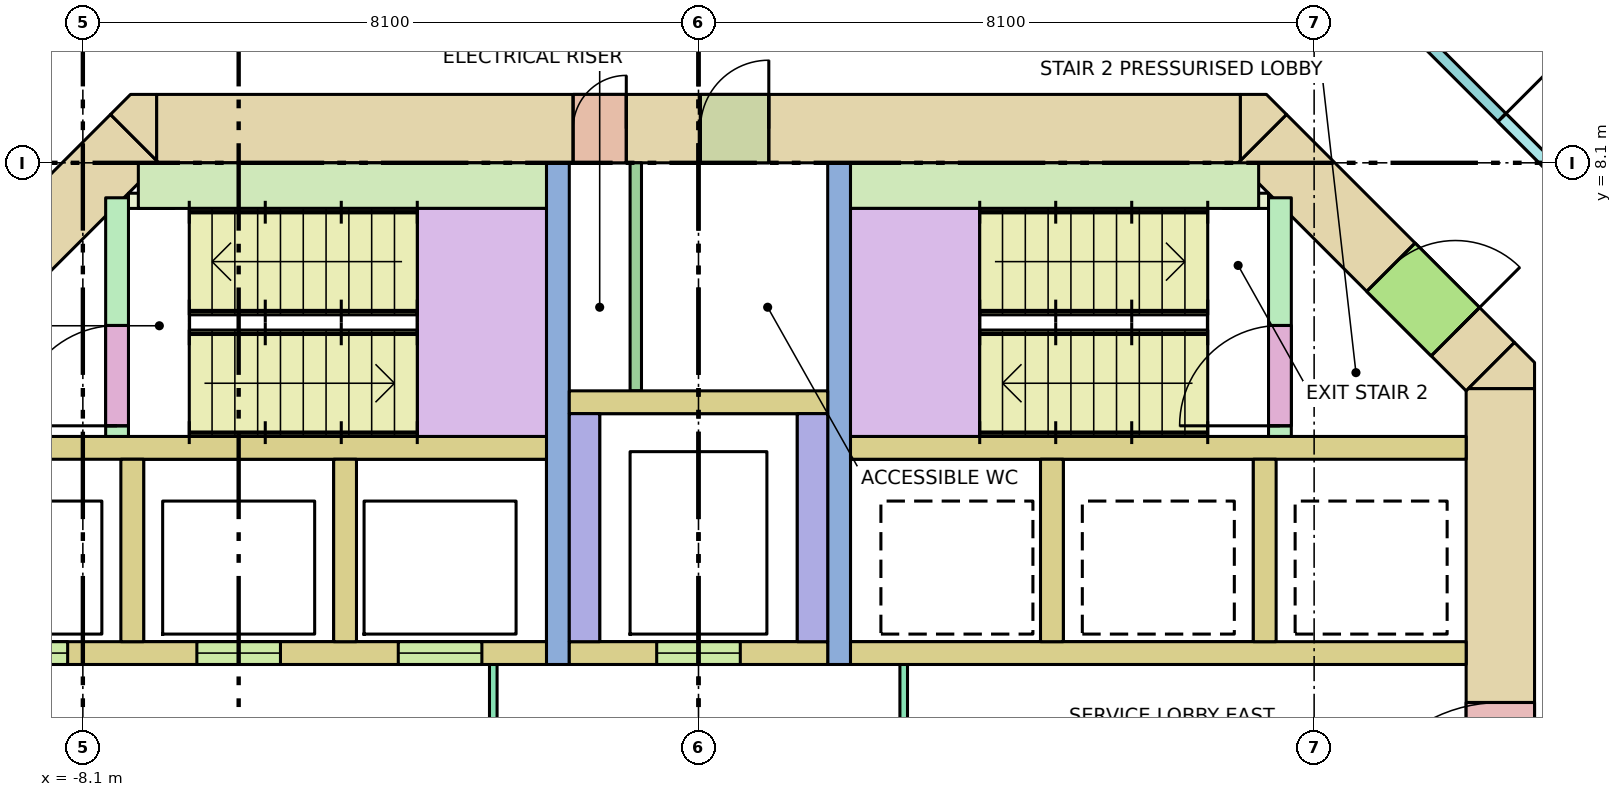
"""IFC4 building model, lengths in metres.
Left out: names, types, materials, properties, quantities, classifications, styles, units other than length and angle.
Written with IfcOpenShell. Run it as: python <this file> out.ifc"""

import sys

from ifc_helpers import new_model, si_unit, direction, frame, frame_2d, origin, place, context, subcontext, project, spatial, polyline, rectangle, outline, extrude, element, fill, save


model = new_model("IFC4")
c1 = context("Model", 3, precision=1e-05, world=origin(), true_north=direction((0.0, 1.0)))
c2 = subcontext(c1, "Body", "Model", "MODEL_VIEW")
j1 = project(units=[si_unit("LENGTHUNIT", "METRE"), si_unit("PLANEANGLEUNIT", "RADIAN")], contexts=[c1])
p1 = place(None, origin())
s1 = spatial("IfcSite", under=j1, at=p1, CompositionType="ELEMENT")
p2 = place(p1, origin())
s2 = spatial("IfcBuilding", under=s1, at=p2, CompositionType="ELEMENT")
p3 = place(p2, frame((0.0, 0.0, 127.6)))
s3 = spatial("IfcBuildingStorey", under=s2, at=p3, CompositionType="ELEMENT", Elevation=127.6)
p4 = place(p3, frame((-7.13, 8.55, -0.28), z_axis=(0.0, 0.0, 1.0), x_axis=(1.0, 0.0, 0.0)))
e1 = element("IfcWall", 1, at=p4, inside=s3, PredefinedType="SHEAR", context=c2, shape_type="SweptSolid", body=[
    extrude(rectangle(XDim=14.26, YDim=0.9, at=frame_2d((7.13, 0.0))), origin(), (0.0, 0.0, 1.0), 3.8),
])
p5 = place(p4, frame((5.48, 0.0, 0.28)))
e2 = element("IfcOpeningElement", 2, at=p5, cuts=e1, PredefinedType="OPENING", context=c2, shape_type="SweptSolid", body=[
    extrude(rectangle(XDim=0.7, YDim=2.1, at=frame_2d((0.35, 1.05))), frame((0.0, 0.46, 0.0), z_axis=(0.0, -1.0, 0.0), x_axis=(1.0, 0.0, 0.0)), (0.0, 0.0, 1.0), 0.92),
])
p6 = place(p4, frame((7.155, 0.0, 0.28)))
e3 = element("IfcOpeningElement", 3, at=p6, cuts=e1, PredefinedType="OPENING", context=c2, shape_type="SweptSolid", body=[
    extrude(rectangle(XDim=0.9, YDim=2.1, at=frame_2d((0.45, 1.05))), frame((0.0, 0.46, 0.0), z_axis=(0.0, -1.0, 0.0), x_axis=(1.0, 0.0, 0.0)), (0.0, 0.0, 1.0), 0.92),
])
p7 = place(p3, frame((10.55, -5.13, -0.28), z_axis=(0.0, 0.0, 1.0), x_axis=(0.0, 1.0, 0.0)))
e4 = element("IfcWall", 4, at=p7, inside=s3, PredefinedType="SHEAR", context=c2, shape_type="SweptSolid", body=[
    extrude(rectangle(XDim=10.26, YDim=0.9, at=frame_2d((5.13, 0.0))), origin(), (0.0, 0.0, 1.0), 3.8),
])
p8 = place(p7, frame((4.13, 0.0, 0.28)))
e5 = element("IfcOpeningElement", 5, at=p8, cuts=e4, PredefinedType="OPENING", context=c2, shape_type="SweptSolid", body=[
    extrude(rectangle(XDim=2.0, YDim=2.1, at=frame_2d((1.0, 1.05))), frame((0.0, 0.46, 0.0), z_axis=(0.0, -1.0, 0.0), x_axis=(1.0, 0.0, 0.0)), (0.0, 0.0, 1.0), 0.92),
])
p9 = place(p3, frame((-10.418, 5.418, -0.28), z_axis=(0.0, 0.0, 1.0), x_axis=(0.707106781187, 0.707106781187, 0.0)))
e6 = element("IfcWall", 6, at=p9, inside=s3, PredefinedType="SHEAR", context=c2, shape_type="SweptSolid", body=[
    extrude(rectangle(XDim=4.243, YDim=0.9, at=frame_2d((2.121, 0.0))), origin(), (0.0, 0.0, 1.0), 3.8),
])
p10 = place(p9, frame((0.65, 0.0, 0.28)))
e7 = element("IfcOpeningElement", 7, at=p10, cuts=e6, PredefinedType="OPENING", context=c2, shape_type="SweptSolid", body=[
    extrude(rectangle(XDim=1.2, YDim=2.1, at=frame_2d((0.6, 1.05))), frame((0.0, 0.46, 0.0), z_axis=(0.0, -1.0, 0.0), x_axis=(1.0, 0.0, 0.0)), (0.0, 0.0, 1.0), 0.92),
])
p11 = place(p3, frame((7.418, 8.418, -0.28), z_axis=(0.0, 0.0, 1.0), x_axis=(0.707106781187, -0.707106781187, 0.0)))
e8 = element("IfcWall", 8, at=p11, inside=s3, PredefinedType="SHEAR", context=c2, shape_type="SweptSolid", body=[
    extrude(rectangle(XDim=4.243, YDim=0.9, at=frame_2d((2.121, 0.0))), origin(), (0.0, 0.0, 1.0), 3.8),
])
p12 = place(p11, frame((2.393, 0.0, 0.28)))
e9 = element("IfcOpeningElement", 9, at=p12, cuts=e8, PredefinedType="OPENING", context=c2, shape_type="SweptSolid", body=[
    extrude(rectangle(XDim=1.2, YDim=2.1, at=frame_2d((0.6, 1.05))), frame((0.0, 0.46, 0.0), z_axis=(0.0, -1.0, 0.0), x_axis=(1.0, 0.0, 0.0)), (0.0, 0.0, 1.0), 0.92),
])
p13 = place(p3, frame((0.0, 0.0, -0.28)))
e10 = element("IfcWall", 10, at=p13, inside=s3, PredefinedType="SHEAR", context=c2, shape_type="SweptSolid", body=[
    extrude(outline(polyline([(11.0, 5.473), (11.0, 5.13), (10.13, 5.13), (10.736, 5.736), (11.0, 5.473)])), origin(), (0.0, 0.0, 1.0), 3.8),
])
p14 = place(p3, frame((0.0, 0.0, -0.28)))
e11 = element("IfcWall", 11, at=p14, inside=s3, PredefinedType="SHEAR", context=c2, shape_type="SweptSolid", body=[
    extrude(outline(polyline([(-7.473, 9.0), (-7.13, 9.0), (-7.13, 8.13), (-7.736, 8.736), (-7.473, 9.0)])), origin(), (0.0, 0.0, 1.0), 3.8),
])
p15 = place(p3, frame((0.0, 0.0, -0.28)))
e12 = element("IfcWall", 12, at=p15, inside=s3, PredefinedType="SHEAR", context=c2, shape_type="SweptSolid", body=[
    extrude(outline(polyline([(7.473, 9.0), (7.736, 8.736), (7.13, 8.13), (7.13, 9.0), (7.473, 9.0)])), origin(), (0.0, 0.0, 1.0), 3.8),
])
for number, where, z_axis, x_axis in (
    (13, (-10.1, 4.35, 0.0), (0.0, 0.0, 1.0), (1.0, 0.0, 0.0)),
    (14, (2.0, 4.35, 0.0), (0.0, 0.0, 1.0), (1.0, 0.0, 0.0)),
):
    element("IfcWall", number, at=place(p3, frame(where, z_axis=z_axis, x_axis=x_axis)), inside=s3, PredefinedType="SOLIDWALL", context=c2, shape_type="SweptSolid", body=[
        extrude(rectangle(XDim=8.1, YDim=0.3, at=frame_2d((4.05, 0.0))), origin(), (0.0, 0.0, 1.0), 3.52),
    ])
p16 = place(p3, frame((-10.1, 1.65, 0.0), z_axis=(0.0, 0.0, 1.0), x_axis=(1.0, 0.0, 0.0)))
e15 = element("IfcWall", 15, at=p16, inside=s3, PredefinedType="SOLIDWALL", context=c2, shape_type="SweptSolid", body=[
    extrude(rectangle(XDim=8.1, YDim=0.3, at=frame_2d((4.05, 0.0))), origin(), (0.0, 0.0, 1.0), 3.52),
])
p17 = place(p16, frame((0.7, 0.0, 0.0)))
e16 = element("IfcOpeningElement", 16, at=p17, cuts=e15, PredefinedType="OPENING", context=c2, shape_type="SweptSolid", body=[
    extrude(rectangle(XDim=1.1, YDim=2.1, at=frame_2d((0.55, 1.05))), frame((0.0, 0.16, 0.0), z_axis=(0.0, -1.0, 0.0), x_axis=(1.0, 0.0, 0.0)), (0.0, 0.0, 1.0), 0.32),
])
p18 = place(p16, frame((3.5, 0.0, 0.0)))
e17 = element("IfcOpeningElement", 17, at=p18, cuts=e15, PredefinedType="OPENING", context=c2, shape_type="SweptSolid", body=[
    extrude(rectangle(XDim=1.1, YDim=2.1, at=frame_2d((0.55, 1.05))), frame((0.0, 0.16, 0.0), z_axis=(0.0, -1.0, 0.0), x_axis=(1.0, 0.0, 0.0)), (0.0, 0.0, 1.0), 0.32),
])
p19 = place(p16, frame((6.15, 0.0, 0.0)))
e18 = element("IfcOpeningElement", 18, at=p19, cuts=e15, PredefinedType="OPENING", context=c2, shape_type="SweptSolid", body=[
    extrude(rectangle(XDim=1.1, YDim=2.1, at=frame_2d((0.55, 1.05))), frame((0.0, 0.16, 0.0), z_axis=(0.0, -1.0, 0.0), x_axis=(1.0, 0.0, 0.0)), (0.0, 0.0, 1.0), 0.32),
])
p20 = place(p3, frame((2.0, 1.65, 0.0), z_axis=(0.0, 0.0, 1.0), x_axis=(1.0, 0.0, 0.0)))
e19 = element("IfcWall", 19, at=p20, inside=s3, PredefinedType="SOLIDWALL", context=c2, shape_type="SweptSolid", body=[
    extrude(rectangle(XDim=8.1, YDim=0.3, at=frame_2d((4.05, 0.0))), origin(), (0.0, 0.0, 1.0), 3.52),
])
for number, where, z_axis, x_axis in (
    (20, (-7.45, 1.8, 0.0), (0.0, 0.0, 1.0), (0.0, 1.0, 0.0)),
    (21, (-4.65, 1.8, 0.0), (0.0, 0.0, 1.0), (0.0, 1.0, 0.0)),
    (22, (4.65, 1.8, 0.0), (0.0, 0.0, 1.0), (0.0, 1.0, 0.0)),
    (23, (7.45, 1.8, 0.0), (0.0, 0.0, 1.0), (0.0, 1.0, 0.0)),
):
    element("IfcWall", number, at=place(p3, frame(where, z_axis=z_axis, x_axis=x_axis)), inside=s3, PredefinedType="SOLIDWALL", context=c2, shape_type="SweptSolid", body=[
        extrude(rectangle(XDim=2.4, YDim=0.3, at=frame_2d((1.2, 0.0))), origin(), (0.0, 0.0, 1.0), 3.52),
    ])
for number, where, z_axis, x_axis in (
    (24, (-1.85, 1.5, 0.0), (0.0, 0.0, 1.0), (0.0, 1.0, 0.0)),
    (25, (1.85, 1.5, 0.0), (0.0, 0.0, 1.0), (0.0, 1.0, 0.0)),
):
    element("IfcWall", number, at=place(p3, frame(where, z_axis=z_axis, x_axis=x_axis)), inside=s3, PredefinedType="SHEAR", context=c2, shape_type="SweptSolid", body=[
        extrude(rectangle(XDim=6.6, YDim=0.3, at=frame_2d((3.3, 0.0))), origin(), (0.0, 0.0, 1.0), 3.52),
    ])
p21 = place(p3, frame((-1.7, 1.65, 0.0), z_axis=(0.0, 0.0, 1.0), x_axis=(1.0, 0.0, 0.0)))
e26 = element("IfcWall", 26, at=p21, inside=s3, PredefinedType="SOLIDWALL", context=c2, shape_type="SweptSolid", body=[
    extrude(rectangle(XDim=3.4, YDim=0.3, at=frame_2d((1.7, 0.0))), origin(), (0.0, 0.0, 1.0), 3.52),
])
p22 = place(p21, frame((1.15, 0.0, 0.0)))
e27 = element("IfcOpeningElement", 27, at=p22, cuts=e26, PredefinedType="OPENING", context=c2, shape_type="SweptSolid", body=[
    extrude(rectangle(XDim=1.1, YDim=2.1, at=frame_2d((0.55, 1.05))), frame((0.0, 0.16, 0.0), z_axis=(0.0, -1.0, 0.0), x_axis=(1.0, 0.0, 0.0)), (0.0, 0.0, 1.0), 0.32),
])
for number, where, z_axis, x_axis in (
    (28, (-1.5, 1.8, 0.0), (0.0, 0.0, 1.0), (0.0, 1.0, 0.0)),
    (29, (1.5, 1.8, 0.0), (0.0, 0.0, 1.0), (0.0, 1.0, 0.0)),
):
    element("IfcWall", number, at=place(p3, frame(where, z_axis=z_axis, x_axis=x_axis)), inside=s3, PredefinedType="SOLIDWALL", context=c2, shape_type="SweptSolid", body=[
        extrude(rectangle(XDim=3.0, YDim=0.4, at=frame_2d((1.5, 0.0))), origin(), (0.0, 0.0, 1.0), 3.52),
    ])
p23 = place(p3, frame((-1.7, 4.95, 0.0), z_axis=(0.0, 0.0, 1.0), x_axis=(1.0, 0.0, 0.0)))
e30 = element("IfcWall", 30, at=p23, inside=s3, PredefinedType="SOLIDWALL", context=c2, shape_type="SweptSolid", body=[
    extrude(rectangle(XDim=3.4, YDim=0.3, at=frame_2d((1.7, 0.0))), origin(), (0.0, 0.0, 1.0), 3.52),
])
p24 = place(p3, frame((-7.65, 4.5, 0.0), z_axis=(0.0, 0.0, 1.0), x_axis=(0.0, 1.0, 0.0)))
e31 = element("IfcWall", 31, at=p24, inside=s3, PredefinedType="SHEAR", context=c2, shape_type="SweptSolid", body=[
    extrude(rectangle(XDim=3.14, YDim=0.3, at=frame_2d((1.57, 0.0))), origin(), (0.0, 0.0, 1.0), 3.52),
])
p25 = place(p24, frame((0.14, 0.0, 0.0)))
e32 = element("IfcOpeningElement", 32, at=p25, cuts=e31, PredefinedType="OPENING", context=c2, shape_type="SweptSolid", body=[
    extrude(rectangle(XDim=1.32, YDim=2.1, at=frame_2d((0.66, 1.05))), frame((0.0, 0.16, 0.0), z_axis=(0.0, -1.0, 0.0), x_axis=(1.0, 0.0, 0.0)), (0.0, 0.0, 1.0), 0.32),
])
p26 = place(p3, frame((-7.37, 7.8, 0.0), z_axis=(0.0, 0.0, 1.0), x_axis=(1.0, 0.0, 0.0)))
e33 = element("IfcWall", 33, at=p26, inside=s3, PredefinedType="SHEAR", context=c2, shape_type="SweptSolid", body=[
    extrude(rectangle(XDim=5.37, YDim=0.6, at=frame_2d((2.685, 0.0))), origin(), (0.0, 0.0, 1.0), 3.52),
])
p27 = place(p3, frame((7.65, 4.5, 0.0), z_axis=(0.0, 0.0, 1.0), x_axis=(0.0, 1.0, 0.0)))
e34 = element("IfcWall", 34, at=p27, inside=s3, PredefinedType="SHEAR", context=c2, shape_type="SweptSolid", body=[
    extrude(rectangle(XDim=3.14, YDim=0.3, at=frame_2d((1.57, 0.0))), origin(), (0.0, 0.0, 1.0), 3.52),
])
p28 = place(p27, frame((0.14, 0.0, 0.0)))
e35 = element("IfcOpeningElement", 35, at=p28, cuts=e34, PredefinedType="OPENING", context=c2, shape_type="SweptSolid", body=[
    extrude(rectangle(XDim=1.32, YDim=2.1, at=frame_2d((0.66, 1.05))), frame((0.0, 0.16, 0.0), z_axis=(0.0, -1.0, 0.0), x_axis=(1.0, 0.0, 0.0)), (0.0, 0.0, 1.0), 0.32),
])
p29 = place(p3, frame((2.0, 7.8, 0.0), z_axis=(0.0, 0.0, 1.0), x_axis=(1.0, 0.0, 0.0)))
e36 = element("IfcWall", 36, at=p29, inside=s3, PredefinedType="SHEAR", context=c2, shape_type="SweptSolid", body=[
    extrude(rectangle(XDim=5.37, YDim=0.6, at=frame_2d((2.685, 0.0))), origin(), (0.0, 0.0, 1.0), 3.52),
])
for number, where, z_axis, x_axis in (
    (37, (-7.5, 7.6, 0.0), (0.0, 0.0, 1.0), (1.0, 0.0, 0.0)),
    (38, (6.9, 7.6, 0.0), (0.0, 0.0, 1.0), (1.0, 0.0, 0.0)),
):
    element("IfcWall", number, at=place(p3, frame(where, z_axis=z_axis, x_axis=x_axis)), inside=s3, PredefinedType="SHEAR", context=c2, shape_type="SweptSolid", body=[
        extrude(rectangle(XDim=0.6, YDim=0.2, at=frame_2d((0.3, 0.0))), origin(), (0.0, 0.0, 1.0), 3.52),
    ])
p30 = place(p3, frame((-2.7, -1.5, 0.0), z_axis=(0.0, 0.0, 1.0), x_axis=(0.0, 1.0, 0.0)))
e39 = element("IfcWall", 39, at=p30, inside=s3, PredefinedType="PARTITIONING", context=c2, shape_type="SweptSolid", body=[
    extrude(rectangle(XDim=3.0, YDim=0.1, at=frame_2d((1.5, 0.0))), origin(), (0.0, 0.0, 1.0), 3.52),
])
p31 = place(p30, frame((0.9, 0.0, 0.0)))
e40 = element("IfcOpeningElement", 40, at=p31, cuts=e39, PredefinedType="OPENING", context=c2, shape_type="SweptSolid", body=[
    extrude(rectangle(XDim=1.2, YDim=2.1, at=frame_2d((0.6, 1.05))), frame((0.0, 0.06, 0.0), z_axis=(0.0, -1.0, 0.0), x_axis=(1.0, 0.0, 0.0)), (0.0, 0.0, 1.0), 0.12),
])
p32 = place(p3, frame((2.7, -1.5, 0.0), z_axis=(0.0, 0.0, 1.0), x_axis=(0.0, 1.0, 0.0)))
e41 = element("IfcWall", 41, at=p32, inside=s3, PredefinedType="PARTITIONING", context=c2, shape_type="SweptSolid", body=[
    extrude(rectangle(XDim=3.0, YDim=0.1, at=frame_2d((1.5, 0.0))), origin(), (0.0, 0.0, 1.0), 3.52),
])
p33 = place(p32, frame((0.9, 0.0, 0.0)))
e42 = element("IfcOpeningElement", 42, at=p33, cuts=e41, PredefinedType="OPENING", context=c2, shape_type="SweptSolid", body=[
    extrude(rectangle(XDim=1.2, YDim=2.1, at=frame_2d((0.6, 1.05))), frame((0.0, 0.06, 0.0), z_axis=(0.0, -1.0, 0.0), x_axis=(1.0, 0.0, 0.0)), (0.0, 0.0, 1.0), 0.12),
])
p34 = place(p3, frame((-0.825, 5.1, 0.0), z_axis=(0.0, 0.0, 1.0), x_axis=(0.0, 1.0, 0.0)))
e43 = element("IfcWall", 43, at=p34, inside=s3, PredefinedType="PARTITIONING", context=c2, shape_type="SweptSolid", body=[
    extrude(rectangle(XDim=3.0, YDim=0.15, at=frame_2d((1.5, 0.0))), origin(), (0.0, 0.0, 1.0), 3.52),
])
p35 = place(p3, frame((-12.938, 6.328, 0.0), z_axis=(0.0, 0.0, 1.0), x_axis=(0.707088206597, 0.707125355289, 0.0)))
e44 = element("IfcWall", 44, at=p35, inside=s3, PredefinedType="PARTITIONING", context=c2, shape_type="SweptSolid", body=[
    extrude(rectangle(XDim=6.572, YDim=0.15, at=frame_2d((3.286, 0.0))), origin(), (0.0, 0.0, 1.0), 2.67),
])
p36 = place(p35, frame((2.398, 0.0, 0.0)))
e45 = element("IfcOpeningElement", 45, at=p36, cuts=e44, PredefinedType="OPENING", context=c2, shape_type="SweptSolid", body=[
    extrude(rectangle(XDim=0.9, YDim=2.1, at=frame_2d((0.45, 1.05))), frame((0.0, 0.085, 0.0), z_axis=(0.0, -1.0, 0.0), x_axis=(1.0, 0.0, 0.0)), (0.0, 0.0, 1.0), 0.17),
])
p37 = place(p3, frame((8.291, 10.975, 0.0), z_axis=(0.0, 0.0, 1.0), x_axis=(0.707106781187, -0.707106781187, 0.0)))
e46 = element("IfcWall", 46, at=p37, inside=s3, PredefinedType="PARTITIONING", context=c2, shape_type="SweptSolid", body=[
    extrude(rectangle(XDim=6.624, YDim=0.15, at=frame_2d((3.312, 0.0))), origin(), (0.0, 0.0, 1.0), 2.67),
])
p38 = place(p37, frame((3.224, 0.0, 0.0)))
e47 = element("IfcOpeningElement", 47, at=p38, cuts=e46, PredefinedType="OPENING", context=c2, shape_type="SweptSolid", body=[
    extrude(rectangle(XDim=1.0, YDim=2.1, at=frame_2d((0.5, 1.05))), frame((0.0, 0.085, 0.0), z_axis=(0.0, -1.0, 0.0), x_axis=(1.0, 0.0, 0.0)), (0.0, 0.0, 1.0), 0.17),
])
p39 = place(p37, frame((0.524, 0.0, 0.0)))
e48 = element("IfcOpeningElement", 48, at=p39, cuts=e46, PredefinedType="OPENING", context=c2, shape_type="SweptSolid", body=[
    extrude(rectangle(XDim=0.9, YDim=2.1, at=frame_2d((0.45, 1.05))), frame((0.0, 0.085, 0.0), z_axis=(0.0, -1.0, 0.0), x_axis=(1.0, 0.0, 0.0)), (0.0, 0.0, 1.0), 0.17),
])
p40 = place(p17, origin())
e49 = element("IfcDoor", 49, at=p40, inside=s3, OperationType="DOUBLE_DOOR_SLIDING", PredefinedType="DOOR", context=c2, shape_type="SweptSolid", body=[
    extrude(rectangle(XDim=1.1, YDim=2.1, at=frame_2d((0.55, 1.05))), frame((0.0, 0.025, 0.0), z_axis=(0.0, -1.0, 0.0), x_axis=(1.0, 0.0, 0.0)), (0.0, 0.0, 1.0), 0.05),
])
fill(e16, e49)
p41 = place(p18, origin())
e50 = element("IfcDoor", 50, at=p41, inside=s3, OperationType="DOUBLE_DOOR_SLIDING", PredefinedType="DOOR", context=c2, shape_type="SweptSolid", body=[
    extrude(rectangle(XDim=1.1, YDim=2.1, at=frame_2d((0.55, 1.05))), frame((0.0, 0.025, 0.0), z_axis=(0.0, -1.0, 0.0), x_axis=(1.0, 0.0, 0.0)), (0.0, 0.0, 1.0), 0.05),
])
fill(e17, e50)
p42 = place(p19, origin())
e51 = element("IfcDoor", 51, at=p42, inside=s3, OperationType="DOUBLE_DOOR_SLIDING", PredefinedType="DOOR", context=c2, shape_type="SweptSolid", body=[
    extrude(rectangle(XDim=1.1, YDim=2.1, at=frame_2d((0.55, 1.05))), frame((0.0, 0.025, 0.0), z_axis=(0.0, -1.0, 0.0), x_axis=(1.0, 0.0, 0.0)), (0.0, 0.0, 1.0), 0.05),
])
fill(e18, e51)
p43 = place(p22, origin())
e52 = element("IfcDoor", 52, at=p43, inside=s3, OperationType="DOUBLE_DOOR_SLIDING", PredefinedType="DOOR", context=c2, shape_type="SweptSolid", body=[
    extrude(rectangle(XDim=1.1, YDim=2.1, at=frame_2d((0.55, 1.05))), frame((0.0, 0.025, 0.0), z_axis=(0.0, -1.0, 0.0), x_axis=(1.0, 0.0, 0.0)), (0.0, 0.0, 1.0), 0.05),
])
fill(e27, e52)
p44 = place(p25, origin())
e53 = element("IfcDoor", 53, at=p44, inside=s3, OperationType="DOUBLE_DOOR_SINGLE_SWING", PredefinedType="DOOR", context=c2, shape_type="SweptSolid", body=[
    extrude(rectangle(XDim=1.32, YDim=2.1, at=frame_2d((0.66, 1.05))), frame((0.0, 0.025, 0.0), z_axis=(0.0, -1.0, 0.0), x_axis=(1.0, 0.0, 0.0)), (0.0, 0.0, 1.0), 0.05),
])
fill(e32, e53)
p45 = place(p28, origin())
e54 = element("IfcDoor", 54, at=p45, inside=s3, OperationType="DOUBLE_DOOR_SINGLE_SWING", PredefinedType="DOOR", context=c2, shape_type="SweptSolid", body=[
    extrude(rectangle(XDim=1.32, YDim=2.1, at=frame_2d((0.66, 1.05))), frame((0.0, 0.025, 0.0), z_axis=(0.0, -1.0, 0.0), x_axis=(1.0, 0.0, 0.0)), (0.0, 0.0, 1.0), 0.05),
])
fill(e35, e54)
p46 = place(p12, origin())
e55 = element("IfcDoor", 55, at=p46, inside=s3, OperationType="SINGLE_SWING_RIGHT", PredefinedType="DOOR", context=c2, shape_type="SweptSolid", body=[
    extrude(rectangle(XDim=1.2, YDim=2.1, at=frame_2d((0.6, 1.05))), frame((0.0, 0.025, 0.0), z_axis=(0.0, -1.0, 0.0), x_axis=(1.0, 0.0, 0.0)), (0.0, 0.0, 1.0), 0.05),
])
fill(e9, e55)
p47 = place(p8, origin())
e56 = element("IfcDoor", 56, at=p47, inside=s3, OperationType="DOUBLE_DOOR_SINGLE_SWING", PredefinedType="DOOR", context=c2, shape_type="SweptSolid", body=[
    extrude(rectangle(XDim=2.0, YDim=2.1, at=frame_2d((1.0, 1.05))), frame((0.0, 0.025, 0.0), z_axis=(0.0, -1.0, 0.0), x_axis=(1.0, 0.0, 0.0)), (0.0, 0.0, 1.0), 0.05),
])
fill(e5, e56)
p48 = place(p5, origin())
e57 = element("IfcDoor", 57, at=p48, inside=s3, OperationType="SINGLE_SWING_RIGHT", PredefinedType="DOOR", context=c2, shape_type="SweptSolid", body=[
    extrude(rectangle(XDim=0.7, YDim=2.1, at=frame_2d((0.35, 1.05))), frame((0.0, 0.025, 0.0), z_axis=(0.0, -1.0, 0.0), x_axis=(1.0, 0.0, 0.0)), (0.0, 0.0, 1.0), 0.05),
])
fill(e2, e57)
p49 = place(p6, origin())
e58 = element("IfcDoor", 58, at=p49, inside=s3, OperationType="SINGLE_SWING_RIGHT", PredefinedType="DOOR", context=c2, shape_type="SweptSolid", body=[
    extrude(rectangle(XDim=0.9, YDim=2.1, at=frame_2d((0.45, 1.05))), frame((0.0, 0.025, 0.0), z_axis=(0.0, -1.0, 0.0), x_axis=(1.0, 0.0, 0.0)), (0.0, 0.0, 1.0), 0.05),
])
fill(e3, e58)
p50 = place(p38, origin())
e59 = element("IfcDoor", 59, at=p50, inside=s3, OperationType="SINGLE_SWING_LEFT", PredefinedType="DOOR", context=c2, shape_type="SweptSolid", body=[
    extrude(rectangle(XDim=1.0, YDim=2.1, at=frame_2d((0.5, 1.05))), frame((0.0, 0.025, 0.0), z_axis=(0.0, -1.0, 0.0), x_axis=(1.0, 0.0, 0.0)), (0.0, 0.0, 1.0), 0.05),
])
fill(e47, e59)
save(model, sys.argv[1])
